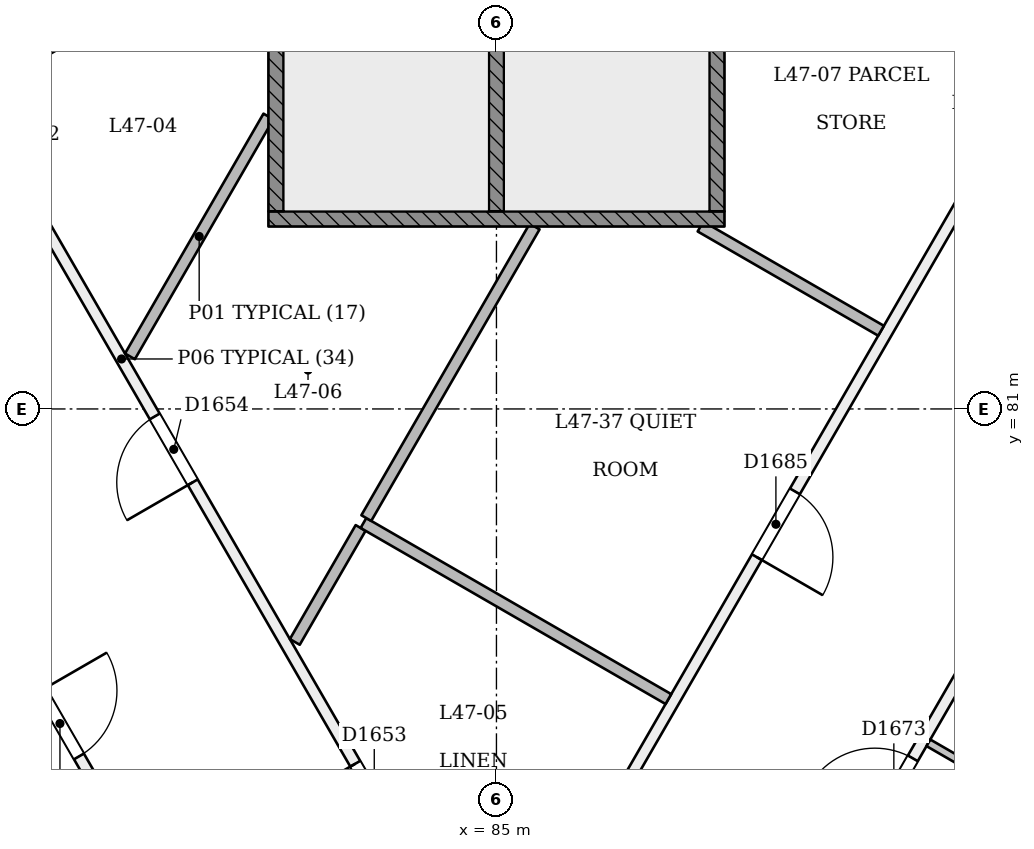
"""IFC4 building model, lengths in metres.
Left out: names, types, materials, properties, quantities, classifications, styles, units other than length and angle.
Written with IfcOpenShell. Run it as: python <this file> out.ifc"""

import sys

from ifc_helpers import new_model, si_unit, direction, frame, frame_2d, origin, place, context, subcontext, project, spatial, rectangle, extrude, element, fill, save


model = new_model("IFC4")
c1 = context("Model", 3, precision=1e-05, world=origin(), true_north=direction((0.0, 1.0)))
c2 = subcontext(c1, "Body", "Model", "MODEL_VIEW")
j1 = project(units=[si_unit("LENGTHUNIT", "METRE"), si_unit("PLANEANGLEUNIT", "RADIAN")], contexts=[c1])
p1 = place(None, origin())
s1 = spatial("IfcSite", under=j1, at=p1, CompositionType="ELEMENT")
p2 = place(p1, origin())
s2 = spatial("IfcBuilding", under=s1, at=p2, CompositionType="ELEMENT")
p3 = place(p2, frame((0.0, 0.0, 181.8)))
s3 = spatial("IfcBuildingStorey", under=s2, at=p3, CompositionType="ELEMENT", Elevation=181.8)
p4 = place(p3, frame((85.0, 73.115, 0.0), z_axis=(0.0, 0.0, 1.0), x_axis=(-0.500000261386, 0.866025252873, 0.0)))
e1 = element("IfcWall", 1, at=p4, inside=s3, PredefinedType="PARTITIONING", context=c2, shape_type="SweptSolid", body=[
    extrude(rectangle(XDim=19.728, YDim=0.15, at=frame_2d((9.864, 0.0))), origin(), (0.0, 0.0, 1.0), 3.15),
])
p5 = place(p4, frame((16.362, 0.0, 0.0)))
e2 = element("IfcOpeningElement", 2, at=p5, cuts=e1, PredefinedType="OPENING", context=c2, shape_type="SweptSolid", body=[
    extrude(rectangle(XDim=0.9, YDim=2.1, at=frame_2d((0.45, 1.05))), frame((0.0, 0.085, 0.0), z_axis=(0.0, -1.0, 0.0), x_axis=(1.0, 0.0, 0.0)), (0.0, 0.0, 1.0), 0.171),
])
p6 = place(p4, frame((11.847, 0.0, 0.0)))
e3 = element("IfcOpeningElement", 3, at=p6, cuts=e1, PredefinedType="OPENING", context=c2, shape_type="SweptSolid", body=[
    extrude(rectangle(XDim=1.0, YDim=2.1, at=frame_2d((0.5, 1.05))), frame((0.0, 0.085, 0.0), z_axis=(0.0, -1.0, 0.0), x_axis=(1.0, 0.0, 0.0)), (0.0, 0.0, 1.0), 0.171),
])
p7 = place(p4, frame((2.715, 0.0, 0.0)))
e4 = element("IfcOpeningElement", 4, at=p7, cuts=e1, PredefinedType="OPENING", context=c2, shape_type="SweptSolid", body=[
    extrude(rectangle(XDim=1.0, YDim=2.1, at=frame_2d((0.5, 1.05))), frame((0.0, 0.085, 0.0), z_axis=(0.0, -1.0, 0.0), x_axis=(1.0, 0.0, 0.0)), (0.0, 0.0, 1.0), 0.171),
])
p8 = place(p4, frame((7.991, 0.0, 0.0)))
e5 = element("IfcOpeningElement", 5, at=p8, cuts=e1, PredefinedType="OPENING", context=c2, shape_type="SweptSolid", body=[
    extrude(rectangle(XDim=1.0, YDim=2.1, at=frame_2d((0.5, 1.05))), frame((0.0, 0.085, 0.0), z_axis=(0.0, -1.0, 0.0), x_axis=(1.0, 0.0, 0.0)), (0.0, 0.0, 1.0), 0.171),
])
p9 = place(p3, frame((71.556, 90.2, 0.0), z_axis=(0.0, 0.0, 1.0), x_axis=(0.499999195485, -0.866025868271, 0.0)))
e6 = element("IfcWall", 6, at=p9, inside=s3, PredefinedType="PARTITIONING", context=c2, shape_type="SweptSolid", body=[
    extrude(rectangle(XDim=26.651, YDim=0.15, at=frame_2d((13.326, 0.0))), origin(), (0.0, 0.0, 1.0), 2.75),
])
p10 = place(p9, frame((0.381, 0.0, 0.0)))
e7 = element("IfcOpeningElement", 7, at=p10, cuts=e6, PredefinedType="OPENING", context=c2, shape_type="SweptSolid", body=[
    extrude(rectangle(XDim=1.0, YDim=2.1, at=frame_2d((0.5, 1.05))), frame((0.0, 0.085, 0.0), z_axis=(0.0, -1.0, 0.0), x_axis=(1.0, 0.0, 0.0)), (0.0, 0.0, 1.0), 0.171),
])
p11 = place(p9, frame((7.047, 0.0, 0.0)))
e8 = element("IfcOpeningElement", 8, at=p11, cuts=e6, PredefinedType="OPENING", context=c2, shape_type="SweptSolid", body=[
    extrude(rectangle(XDim=1.0, YDim=2.1, at=frame_2d((0.5, 1.05))), frame((0.0, 0.085, 0.0), z_axis=(0.0, -1.0, 0.0), x_axis=(1.0, 0.0, 0.0)), (0.0, 0.0, 1.0), 0.171),
])
p12 = place(p9, frame((10.402, 0.0, 0.0)))
e9 = element("IfcOpeningElement", 9, at=p12, cuts=e6, PredefinedType="OPENING", context=c2, shape_type="SweptSolid", body=[
    extrude(rectangle(XDim=1.0, YDim=2.1, at=frame_2d((0.5, 1.05))), frame((0.0, 0.085, 0.0), z_axis=(0.0, -1.0, 0.0), x_axis=(1.0, 0.0, 0.0)), (0.0, 0.0, 1.0), 0.171),
])
p13 = place(p9, frame((14.902, 0.0, 0.0)))
e10 = element("IfcOpeningElement", 10, at=p13, cuts=e6, PredefinedType="OPENING", context=c2, shape_type="SweptSolid", body=[
    extrude(rectangle(XDim=1.0, YDim=2.1, at=frame_2d((0.5, 1.05))), frame((0.0, 0.085, 0.0), z_axis=(0.0, -1.0, 0.0), x_axis=(1.0, 0.0, 0.0)), (0.0, 0.0, 1.0), 0.171),
])
p14 = place(p9, frame((18.372, 0.0, 0.0)))
e11 = element("IfcOpeningElement", 11, at=p14, cuts=e6, PredefinedType="OPENING", context=c2, shape_type="SweptSolid", body=[
    extrude(rectangle(XDim=1.0, YDim=2.1, at=frame_2d((0.5, 1.05))), frame((0.0, 0.085, 0.0), z_axis=(0.0, -1.0, 0.0), x_axis=(1.0, 0.0, 0.0)), (0.0, 0.0, 1.0), 0.171),
])
p15 = place(p9, frame((24.933, 0.0, 0.0)))
e12 = element("IfcOpeningElement", 12, at=p15, cuts=e6, PredefinedType="OPENING", context=c2, shape_type="SweptSolid", body=[
    extrude(rectangle(XDim=1.0, YDim=2.1, at=frame_2d((0.5, 1.05))), frame((0.0, 0.085, 0.0), z_axis=(0.0, -1.0, 0.0), x_axis=(1.0, 0.0, 0.0)), (0.0, 0.0, 1.0), 0.171),
])
p16 = place(p3, frame((85.033, 66.972, 0.0), z_axis=(0.0, 0.0, 1.0), x_axis=(0.500001115073, 0.866024759996, 0.0)))
e13 = element("IfcWall", 13, at=p16, inside=s3, PredefinedType="PARTITIONING", context=c2, shape_type="SweptSolid", body=[
    extrude(rectangle(XDim=26.822, YDim=0.15, at=frame_2d((13.411, 0.0))), origin(), (0.0, 0.0, 1.0), 2.75),
])
p17 = place(p16, frame((0.527, 0.0, 0.0)))
e14 = element("IfcOpeningElement", 14, at=p17, cuts=e13, PredefinedType="OPENING", context=c2, shape_type="SweptSolid", body=[
    extrude(rectangle(XDim=1.2, YDim=2.1, at=frame_2d((0.6, 1.05))), frame((0.0, 0.085, 0.0), z_axis=(0.0, -1.0, 0.0), x_axis=(1.0, 0.0, 0.0)), (0.0, 0.0, 1.0), 0.171),
])
p18 = place(p16, frame((7.566, 0.0, 0.0)))
e15 = element("IfcOpeningElement", 15, at=p18, cuts=e13, PredefinedType="OPENING", context=c2, shape_type="SweptSolid", body=[
    extrude(rectangle(XDim=1.0, YDim=2.1, at=frame_2d((0.5, 1.05))), frame((0.0, 0.085, 0.0), z_axis=(0.0, -1.0, 0.0), x_axis=(1.0, 0.0, 0.0)), (0.0, 0.0, 1.0), 0.171),
])
p19 = place(p16, frame((9.891, 0.0, 0.0)))
e16 = element("IfcOpeningElement", 16, at=p19, cuts=e13, PredefinedType="OPENING", context=c2, shape_type="SweptSolid", body=[
    extrude(rectangle(XDim=1.0, YDim=2.1, at=frame_2d((0.5, 1.05))), frame((0.0, 0.085, 0.0), z_axis=(0.0, -1.0, 0.0), x_axis=(1.0, 0.0, 0.0)), (0.0, 0.0, 1.0), 0.171),
])
p20 = place(p16, frame((16.45, 0.0, 0.0)))
e17 = element("IfcOpeningElement", 17, at=p20, cuts=e13, PredefinedType="OPENING", context=c2, shape_type="SweptSolid", body=[
    extrude(rectangle(XDim=1.0, YDim=2.1, at=frame_2d((0.5, 1.05))), frame((0.0, 0.085, 0.0), z_axis=(0.0, -1.0, 0.0), x_axis=(1.0, 0.0, 0.0)), (0.0, 0.0, 1.0), 0.171),
])
p21 = place(p16, frame((18.891, 0.0, 0.0)))
e18 = element("IfcOpeningElement", 18, at=p21, cuts=e13, PredefinedType="OPENING", context=c2, shape_type="SweptSolid", body=[
    extrude(rectangle(XDim=1.0, YDim=2.1, at=frame_2d((0.5, 1.05))), frame((0.0, 0.085, 0.0), z_axis=(0.0, -1.0, 0.0), x_axis=(1.0, 0.0, 0.0)), (0.0, 0.0, 1.0), 0.171),
])
p22 = place(p16, frame((24.413, 0.0, 0.0)))
e19 = element("IfcOpeningElement", 19, at=p22, cuts=e13, PredefinedType="OPENING", context=c2, shape_type="SweptSolid", body=[
    extrude(rectangle(XDim=1.0, YDim=2.1, at=frame_2d((0.5, 1.05))), frame((0.0, 0.085, 0.0), z_axis=(0.0, -1.0, 0.0), x_axis=(1.0, 0.0, 0.0)), (0.0, 0.0, 1.0), 0.171),
])
p23 = place(p3, frame((94.864, 90.2, 0.0), z_axis=(0.0, 0.0, 1.0), x_axis=(-0.500001743747, -0.866024397029, 0.0)))
e20 = element("IfcWall", 20, at=p23, inside=s3, PredefinedType="PARTITIONING", context=c2, shape_type="SweptSolid", body=[
    extrude(rectangle(XDim=19.598, YDim=0.15, at=frame_2d((9.799, 0.0))), origin(), (0.0, 0.0, 1.0), 3.15),
])
p24 = place(p23, frame((6.408, 0.0, 0.0)))
e21 = element("IfcOpeningElement", 21, at=p24, cuts=e20, PredefinedType="OPENING", context=c2, shape_type="SweptSolid", body=[
    extrude(rectangle(XDim=1.0, YDim=2.1, at=frame_2d((0.5, 1.05))), frame((0.0, 0.085, 0.0), z_axis=(0.0, -1.0, 0.0), x_axis=(1.0, 0.0, 0.0)), (0.0, 0.0, 1.0), 0.171),
])
p25 = place(p23, frame((11.875, 0.0, 0.0)))
e22 = element("IfcOpeningElement", 22, at=p25, cuts=e20, PredefinedType="OPENING", context=c2, shape_type="SweptSolid", body=[
    extrude(rectangle(XDim=1.0, YDim=2.1, at=frame_2d((0.5, 1.05))), frame((0.0, 0.085, 0.0), z_axis=(0.0, -1.0, 0.0), x_axis=(1.0, 0.0, 0.0)), (0.0, 0.0, 1.0), 0.171),
])
p26 = place(p23, frame((2.596, 0.0, 0.0)))
e23 = element("IfcOpeningElement", 23, at=p26, cuts=e20, PredefinedType="OPENING", context=c2, shape_type="SweptSolid", body=[
    extrude(rectangle(XDim=1.0, YDim=2.1, at=frame_2d((0.5, 1.05))), frame((0.0, 0.085, 0.0), z_axis=(0.0, -1.0, 0.0), x_axis=(1.0, 0.0, 0.0)), (0.0, 0.0, 1.0), 0.171),
])
p27 = place(p3, frame((78.135, 85.155, 0.0), z_axis=(0.0, 0.0, 1.0), x_axis=(0.866036176647, 0.49998134039, 0.0)))
e24 = element("IfcWall", 24, at=p27, inside=s3, PredefinedType="PARTITIONING", context=c2, shape_type="SweptSolid", body=[
    extrude(rectangle(XDim=4.463, YDim=0.1, at=frame_2d((2.231, 0.0))), origin(), (0.0, 0.0, 1.0), 3.15),
])
p28 = place(p3, frame((80.178, 81.692, 0.0), z_axis=(0.0, 0.0, 1.0), x_axis=(0.500037576254, 0.866003708037, 0.0)))
e25 = element("IfcWall", 25, at=p28, inside=s3, PredefinedType="PARTITIONING", context=c2, shape_type="SweptSolid", body=[
    extrude(rectangle(XDim=3.644, YDim=0.15, at=frame_2d((1.822, 0.0))), origin(), (0.0, 0.0, 1.0), 3.15),
])
p29 = place(p3, frame((83.213, 79.435, 0.0), z_axis=(0.0, 0.0, 1.0), x_axis=(-0.499990973765, -0.866030615021, 0.0)))
e26 = element("IfcWall", 26, at=p29, inside=s3, PredefinedType="PARTITIONING", context=c2, shape_type="SweptSolid", body=[
    extrude(rectangle(XDim=1.731, YDim=0.15, at=frame_2d((0.866, 0.0))), origin(), (0.0, 0.0, 1.0), 3.15),
])
p30 = place(p3, frame((87.262, 77.183, 0.0), z_axis=(0.0, 0.0, 1.0), x_axis=(-0.866016206699, 0.500015929481, 0.0)))
e27 = element("IfcWall", 27, at=p30, inside=s3, PredefinedType="PARTITIONING", context=c2, shape_type="SweptSolid", body=[
    extrude(rectangle(XDim=4.633, YDim=0.15, at=frame_2d((2.316, 0.0))), origin(), (0.0, 0.0, 1.0), 3.15),
])
p31 = place(p3, frame((83.288, 79.564, 0.0), z_axis=(0.0, 0.0, 1.0), x_axis=(0.49999285859, 0.86602952684, 0.0)))
e28 = element("IfcWall", 28, at=p31, inside=s3, PredefinedType="PARTITIONING", context=c2, shape_type="SweptSolid", body=[
    extrude(rectangle(XDim=4.429, YDim=0.15, at=frame_2d((2.214, 0.0))), origin(), (0.0, 0.0, 1.0), 3.15),
])
p32 = place(p3, frame((87.685, 83.4, 0.0), z_axis=(0.0, 0.0, 1.0), x_axis=(0.866043267704, -0.499969057507, 0.0)))
e29 = element("IfcWall", 29, at=p32, inside=s3, PredefinedType="PARTITIONING", context=c2, shape_type="SweptSolid", body=[
    extrude(rectangle(XDim=2.742, YDim=0.15, at=frame_2d((1.371, 0.0))), origin(), (0.0, 0.0, 1.0), 3.15),
])
p33 = place(p3, frame((93.129, 75.195, 0.0), z_axis=(0.0, 0.0, 1.0), x_axis=(-0.866011447264, 0.500024172624, 0.0)))
e30 = element("IfcWall", 30, at=p33, inside=s3, PredefinedType="PARTITIONING", context=c2, shape_type="SweptSolid", body=[
    extrude(rectangle(XDim=2.825, YDim=0.1, at=frame_2d((1.413, 0.0))), origin(), (0.0, 0.0, 1.0), 3.15),
])
p34 = place(p3, frame((82.0, 83.5, 0.0), z_axis=(0.0, 0.0, 1.0), x_axis=(1.0, 0.0, 0.0)))
e31 = element("IfcWall", 31, at=p34, inside=s3, PredefinedType="SOLIDWALL", context=c2, shape_type="SweptSolid", body=[
    extrude(rectangle(XDim=6.0, YDim=0.2, at=frame_2d((3.0, 0.0))), origin(), (0.0, 0.0, 1.0), 3.15),
])
for number, where, z_axis, x_axis in (
    (32, (82.1, 83.6, 0.0), (0.0, 0.0, 1.0), (0.0, 1.0, 0.0)),
    (33, (87.9, 83.6, 0.0), (0.0, 0.0, 1.0), (0.0, 1.0, 0.0)),
    (34, (85.0, 83.6, 0.0), (0.0, 0.0, 1.0), (0.0, 1.0, 0.0)),
):
    element("IfcWall", number, at=place(p3, frame(where, z_axis=z_axis, x_axis=x_axis)), inside=s3, PredefinedType="SOLIDWALL", context=c2, shape_type="SweptSolid", body=[
        extrude(rectangle(XDim=6.8, YDim=0.2, at=frame_2d((3.4, 0.0))), origin(), (0.0, 0.0, 1.0), 3.15),
    ])
p35 = place(p7, origin())
e35 = element("IfcDoor", 35, at=p35, inside=s3, OperationType="SINGLE_SWING_RIGHT", PredefinedType="NOTDEFINED", context=c2, shape_type="SweptSolid", body=[
    extrude(rectangle(XDim=1.0, YDim=2.1, at=frame_2d((0.5, 1.05))), frame((0.0, 0.025, 0.0), z_axis=(0.0, -1.0, 0.0), x_axis=(1.0, 0.0, 0.0)), (0.0, 0.0, 1.0), 0.05),
])
fill(e4, e35)
p36 = place(p8, origin())
e36 = element("IfcDoor", 36, at=p36, inside=s3, OperationType="SINGLE_SWING_LEFT", PredefinedType="NOTDEFINED", context=c2, shape_type="SweptSolid", body=[
    extrude(rectangle(XDim=1.0, YDim=2.1, at=frame_2d((0.5, 1.05))), frame((0.0, 0.025, 0.0), z_axis=(0.0, -1.0, 0.0), x_axis=(1.0, 0.0, 0.0)), (0.0, 0.0, 1.0), 0.05),
])
fill(e5, e36)
p37 = place(p13, origin())
e37 = element("IfcDoor", 37, at=p37, inside=s3, OperationType="SINGLE_SWING_LEFT", PredefinedType="NOTDEFINED", context=c2, shape_type="SweptSolid", body=[
    extrude(rectangle(XDim=1.0, YDim=2.1, at=frame_2d((0.5, 1.05))), frame((0.0, 0.025, 0.0), z_axis=(0.0, -1.0, 0.0), x_axis=(1.0, 0.0, 0.0)), (0.0, 0.0, 1.0), 0.05),
])
fill(e10, e37)
p38 = place(p19, origin())
e38 = element("IfcDoor", 38, at=p38, inside=s3, OperationType="SINGLE_SWING_LEFT", PredefinedType="NOTDEFINED", context=c2, shape_type="SweptSolid", body=[
    extrude(rectangle(XDim=1.0, YDim=2.1, at=frame_2d((0.5, 1.05))), frame((0.0, 0.025, 0.0), z_axis=(0.0, -1.0, 0.0), x_axis=(1.0, 0.0, 0.0)), (0.0, 0.0, 1.0), 0.05),
])
fill(e16, e38)
p39 = place(p25, origin())
e39 = element("IfcDoor", 39, at=p39, inside=s3, OperationType="SINGLE_SWING_RIGHT", PredefinedType="NOTDEFINED", context=c2, shape_type="SweptSolid", body=[
    extrude(rectangle(XDim=1.0, YDim=2.1, at=frame_2d((0.5, 1.05))), frame((0.0, 0.025, 0.0), z_axis=(0.0, -1.0, 0.0), x_axis=(1.0, 0.0, 0.0)), (0.0, 0.0, 1.0), 0.05),
])
fill(e22, e39)
save(model, sys.argv[1])
